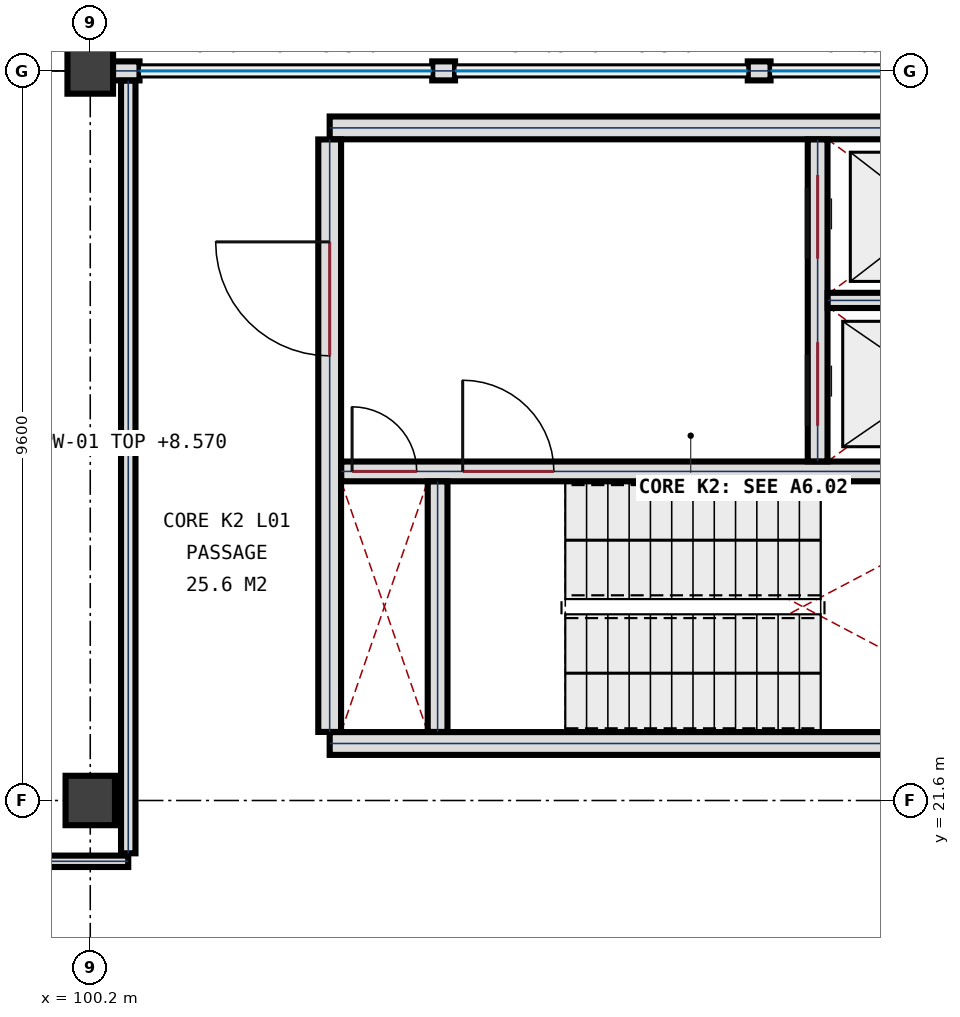
"""IFC4 building model, lengths in metres.
Left out: names, types, materials, properties, quantities, classifications, styles, units other than length and angle.
Written with IfcOpenShell. Run it as: python <this file> out.ifc"""

import sys

from ifc_helpers import new_model, si_unit, direction, frame, frame_2d, origin, origin_2d, place, context, subcontext, project, spatial, rectangle, extrude, element, fill, save


model = new_model("IFC4")
c1 = context("Model", 3, precision=1e-05, world=origin(), true_north=direction((0.0, 1.0)))
c2 = subcontext(c1, "Body", "Model", "MODEL_VIEW")
j1 = project(units=[si_unit("LENGTHUNIT", "METRE"), si_unit("PLANEANGLEUNIT", "RADIAN")], contexts=[c1])
p1 = place(None, origin())
s1 = spatial("IfcSite", under=j1, at=p1, CompositionType="ELEMENT")
p2 = place(p1, origin())
s2 = spatial("IfcBuilding", under=s1, at=p2, CompositionType="ELEMENT")
p3 = place(p2, frame((0.0, 0.0, 5.4)))
s3 = spatial("IfcBuildingStorey", under=s2, at=p3, CompositionType="ELEMENT", Elevation=5.4)
p4 = place(p3, frame((100.2, 21.6, 0.0), z_axis=(0.0, 0.0, 1.0), x_axis=(1.0, 0.0, 0.0)))
e1 = element("IfcColumn", 1, at=p4, inside=s3, PredefinedType="COLUMN", context=c2, shape_type="SweptSolid", body=[
    extrude(rectangle(XDim=0.65, YDim=0.65, at=origin_2d()), origin(), (0.0, 0.0, 1.0), 4.5),
])
p5 = place(p3, frame((100.2, 31.2, 0.0), z_axis=(0.0, 0.0, 1.0), x_axis=(1.0, 0.0, 0.0)))
e2 = element("IfcColumn", 2, at=p5, inside=s3, PredefinedType="COLUMN", context=c2, shape_type="SweptSolid", body=[
    extrude(rectangle(XDim=0.6, YDim=0.6, at=origin_2d()), origin(), (0.0, 0.0, 1.0), 4.5),
])
p6 = place(p3, frame((100.498, 31.2, 0.0), z_axis=(0.0, 0.0, 1.0), x_axis=(1.0, 0.0, 0.0)))
e3 = element("IfcWall", 3, at=p6, inside=s3, PredefinedType="SOLIDWALL", context=c2, shape_type="SweptSolid", body=[
    extrude(rectangle(XDim=0.35, YDim=0.25, at=frame_2d((0.175, 0.0))), origin(), (0.0, 0.0, 1.0), 3.17),
])
for number, where, z_axis, x_axis in (
    (4, (104.699, 31.2, 0.0), (0.0, 0.0, 1.0), (1.0, 0.0, 0.0)),
    (5, (108.851, 31.2, 0.0), (0.0, 0.0, 1.0), (1.0, 0.0, 0.0)),
):
    element("IfcWall", number, at=place(p3, frame(where, z_axis=z_axis, x_axis=x_axis)), inside=s3, PredefinedType="SOLIDWALL", context=c2, shape_type="SweptSolid", body=[
        extrude(rectangle(XDim=0.3, YDim=0.25, at=frame_2d((0.15, 0.0))), origin(), (0.0, 0.0, 1.0), 3.17),
    ])
for number, where, z_axis, x_axis in (
    (6, (112.85, 22.35, 0.0), (0.0, 0.0, 1.0), (-1.0, 0.0, 0.0)),
    (7, (103.35, 30.45, 0.0), (0.0, 0.0, 1.0), (1.0, 0.0, 0.0)),
):
    element("IfcWall", number, at=place(p3, frame(where, z_axis=z_axis, x_axis=x_axis)), inside=s3, PredefinedType="SHEAR", context=c2, shape_type="SweptSolid", body=[
        extrude(rectangle(XDim=9.5, YDim=0.3, at=frame_2d((4.75, 0.0))), origin(), (0.0, 0.0, 1.0), 4.5),
    ])
p7 = place(p3, frame((103.35, 22.502, 0.0), z_axis=(0.0, 0.0, 1.0), x_axis=(0.0, 1.0, 0.0)))
e8 = element("IfcWall", 8, at=p7, inside=s3, PredefinedType="SHEAR", context=c2, shape_type="SweptSolid", body=[
    extrude(rectangle(XDim=7.796, YDim=0.3, at=frame_2d((3.898, 0.0))), origin(), (0.0, 0.0, 1.0), 4.5),
])
p8 = place(p7, frame((4.948, 0.0, 0.0)))
e9 = element("IfcOpeningElement", 9, at=p8, cuts=e8, PredefinedType="OPENING", context=c2, shape_type="SweptSolid", body=[
    extrude(rectangle(XDim=1.5, YDim=2.25, at=frame_2d((0.75, 1.125))), frame((0.0, 0.16, 0.0), z_axis=(0.0, -1.0, 0.0), x_axis=(1.0, 0.0, 0.0)), (0.0, 0.0, 1.0), 0.32),
])
p9 = place(p3, frame((103.502, 25.93, 0.0), z_axis=(0.0, 0.0, 1.0), x_axis=(1.0, 0.0, 0.0)))
e10 = element("IfcWall", 10, at=p9, inside=s3, PredefinedType="SHEAR", context=c2, shape_type="SweptSolid", body=[
    extrude(rectangle(XDim=9.196, YDim=0.26, at=frame_2d((4.598, 0.0))), origin(), (0.0, 0.0, 1.0), 4.5),
])
p10 = place(p9, frame((1.598, 0.0, 0.0)))
e11 = element("IfcOpeningElement", 11, at=p10, cuts=e10, PredefinedType="OPENING", context=c2, shape_type="SweptSolid", body=[
    extrude(rectangle(XDim=1.2, YDim=2.2, at=frame_2d((0.6, 1.1))), frame((0.0, 0.14, 0.0), z_axis=(0.0, -1.0, 0.0), x_axis=(1.0, 0.0, 0.0)), (0.0, 0.0, 1.0), 0.28),
])
p11 = place(p9, frame((0.143, 0.0, 0.0)))
e12 = element("IfcOpeningElement", 12, at=p11, cuts=e10, PredefinedType="OPENING", context=c2, shape_type="SweptSolid", body=[
    extrude(rectangle(XDim=0.85, YDim=2.05, at=frame_2d((0.425, 1.025))), frame((0.0, 0.14, 0.0), z_axis=(0.0, -1.0, 0.0), x_axis=(1.0, 0.0, 0.0)), (0.0, 0.0, 1.0), 0.28),
])
p12 = place(p3, frame((104.77, 22.502, 0.0), z_axis=(0.0, 0.0, 1.0), x_axis=(0.0, 1.0, 0.0)))
e13 = element("IfcWall", 13, at=p12, inside=s3, PredefinedType="SHEAR", context=c2, shape_type="SweptSolid", body=[
    extrude(rectangle(XDim=3.296, YDim=0.26, at=frame_2d((1.648, 0.0))), origin(), (0.0, 0.0, 1.0), 4.5),
])
p13 = place(p3, frame((109.77, 26.062, 0.0), z_axis=(0.0, 0.0, 1.0), x_axis=(0.0, 1.0, 0.0)))
e14 = element("IfcWall", 14, at=p13, inside=s3, PredefinedType="SHEAR", context=c2, shape_type="SweptSolid", body=[
    extrude(rectangle(XDim=4.236, YDim=0.26, at=frame_2d((2.118, 0.0))), origin(), (0.0, 0.0, 1.0), 4.5),
])
p14 = place(p13, frame((0.468, 0.0, 0.0)))
e15 = element("IfcOpeningElement", 15, at=p14, cuts=e14, PredefinedType="OPENING", context=c2, shape_type="SweptSolid", body=[
    extrude(rectangle(XDim=1.1, YDim=2.15, at=frame_2d((0.55, 1.075))), frame((0.0, 0.14, 0.0), z_axis=(0.0, -1.0, 0.0), x_axis=(1.0, 0.0, 0.0)), (0.0, 0.0, 1.0), 0.28),
])
p15 = place(p13, frame((2.668, 0.0, 0.0)))
e16 = element("IfcOpeningElement", 16, at=p15, cuts=e14, PredefinedType="OPENING", context=c2, shape_type="SweptSolid", body=[
    extrude(rectangle(XDim=1.1, YDim=2.15, at=frame_2d((0.55, 1.075))), frame((0.0, 0.14, 0.0), z_axis=(0.0, -1.0, 0.0), x_axis=(1.0, 0.0, 0.0)), (0.0, 0.0, 1.0), 0.28),
])
p16 = place(p3, frame((109.902, 28.18, 0.0), z_axis=(0.0, 0.0, 1.0), x_axis=(1.0, 0.0, 0.0)))
e17 = element("IfcWall", 17, at=p16, inside=s3, PredefinedType="PLUMBINGWALL", context=c2, shape_type="SweptSolid", body=[
    extrude(rectangle(XDim=2.796, YDim=0.2, at=frame_2d((1.398, 0.0))), origin(), (0.0, 0.0, 1.0), 4.18),
])
p17 = place(p3, frame((59.2, 20.8, 0.0), z_axis=(0.0, 0.0, 1.0), x_axis=(1.0, 0.0, 0.0)))
e18 = element("IfcWall", 18, at=p17, inside=s3, PredefinedType="PARTITIONING", context=c2, shape_type="SweptSolid", body=[
    extrude(rectangle(XDim=41.5, YDim=0.15, at=frame_2d((20.75, 0.0))), origin(), (0.0, 0.0, 1.0), 3.52),
])
p18 = place(p17, frame((19.875, 0.0, 0.0)))
e19 = element("IfcOpeningElement", 19, at=p18, cuts=e18, PredefinedType="OPENING", context=c2, shape_type="SweptSolid", body=[
    extrude(rectangle(XDim=1.85, YDim=2.35, at=frame_2d((0.925, 1.175))), frame((0.0, 0.085, 0.0), z_axis=(0.0, -1.0, 0.0), x_axis=(1.0, 0.0, 0.0)), (0.0, 0.0, 1.0), 0.17),
])
p19 = place(p3, frame((100.7, 20.905, 0.0), z_axis=(0.0, 0.0, 1.0), x_axis=(0.0, 1.0, 0.0)))
e20 = element("IfcWall", 20, at=p19, inside=s3, PredefinedType="PARTITIONING", context=c2, shape_type="SweptSolid", body=[
    extrude(rectangle(XDim=10.166, YDim=0.19, at=frame_2d((5.083, 0.0))), origin(), (0.0, 0.0, 1.0), 3.17),
])
p20 = place(p8, origin())
e21 = element("IfcDoor", 21, at=p20, inside=s3, OperationType="SINGLE_SWING_RIGHT", PredefinedType="DOOR", context=c2, shape_type="SweptSolid", body=[
    extrude(rectangle(XDim=1.5, YDim=2.25, at=frame_2d((0.75, 1.125))), frame((0.0, 0.032, 0.0), z_axis=(0.0, -1.0, 0.0), x_axis=(1.0, 0.0, 0.0)), (0.0, 0.0, 1.0), 0.065),
])
fill(e9, e21)
p21 = place(p10, origin())
e22 = element("IfcDoor", 22, at=p21, inside=s3, OperationType="SINGLE_SWING_LEFT", PredefinedType="DOOR", context=c2, shape_type="SweptSolid", body=[
    extrude(rectangle(XDim=1.2, YDim=2.2, at=frame_2d((0.6, 1.1))), frame((0.0, 0.032, 0.0), z_axis=(0.0, -1.0, 0.0), x_axis=(1.0, 0.0, 0.0)), (0.0, 0.0, 1.0), 0.065),
])
fill(e11, e22)
p22 = place(p11, origin())
e23 = element("IfcDoor", 23, at=p22, inside=s3, OperationType="SINGLE_SWING_LEFT", PredefinedType="DOOR", context=c2, shape_type="SweptSolid", body=[
    extrude(rectangle(XDim=0.85, YDim=2.05, at=frame_2d((0.425, 1.025))), frame((0.0, 0.032, 0.0), z_axis=(0.0, -1.0, 0.0), x_axis=(1.0, 0.0, 0.0)), (0.0, 0.0, 1.0), 0.065),
])
fill(e12, e23)
p23 = place(p14, origin())
e24 = element("IfcDoor", 24, at=p23, inside=s3, OperationType="SLIDING_TO_LEFT", PredefinedType="DOOR", context=c2, shape_type="SweptSolid", body=[
    extrude(rectangle(XDim=1.1, YDim=2.15, at=frame_2d((0.55, 1.075))), frame((0.0, 0.032, 0.0), z_axis=(0.0, -1.0, 0.0), x_axis=(1.0, 0.0, 0.0)), (0.0, 0.0, 1.0), 0.065),
])
fill(e15, e24)
p24 = place(p15, origin())
e25 = element("IfcDoor", 25, at=p24, inside=s3, OperationType="SLIDING_TO_LEFT", PredefinedType="DOOR", context=c2, shape_type="SweptSolid", body=[
    extrude(rectangle(XDim=1.1, YDim=2.15, at=frame_2d((0.55, 1.075))), frame((0.0, 0.032, 0.0), z_axis=(0.0, -1.0, 0.0), x_axis=(1.0, 0.0, 0.0)), (0.0, 0.0, 1.0), 0.065),
])
fill(e16, e25)
save(model, sys.argv[1])
